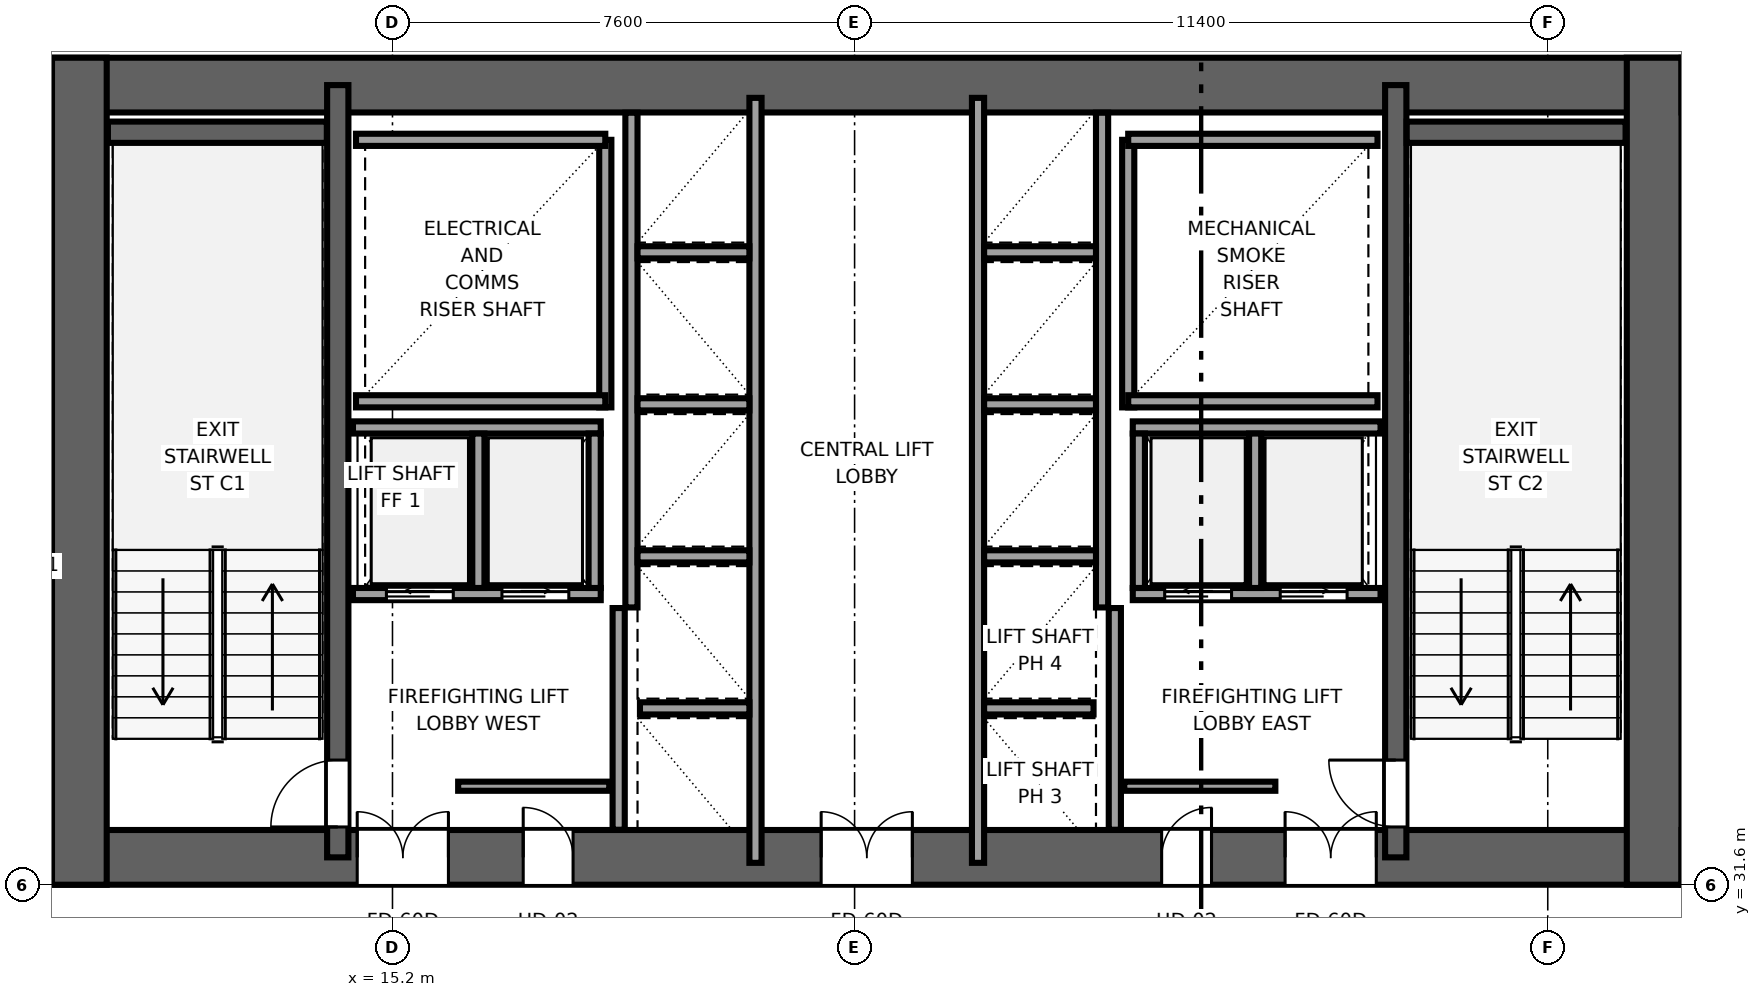
"""IFC4 building model, lengths in metres.
Left out: names, types, materials, properties, quantities, classifications, styles, units other than length and angle.
Written with IfcOpenShell. Run it as: python <this file> out.ifc"""

import sys

from ifc_helpers import new_model, si_unit, direction, frame, frame_2d, origin, place, context, subcontext, project, spatial, rectangle, extrude, source, transform, mapped, element, fill, save


model = new_model("IFC4")
c1 = context("Model", 3, precision=1e-05, world=origin(), true_north=direction((0.0, 1.0)))
c2 = subcontext(c1, "Body", "Model", "MODEL_VIEW")
j1 = project(units=[si_unit("LENGTHUNIT", "METRE"), si_unit("PLANEANGLEUNIT", "RADIAN")], contexts=[c1])
p1 = place(None, origin())
s1 = spatial("IfcSite", under=j1, at=p1, CompositionType="ELEMENT")
p2 = place(p1, origin())
s2 = spatial("IfcBuilding", under=s1, at=p2, CompositionType="ELEMENT")
p3 = place(p2, frame((0.0, 0.0, 92.35)))
s3 = spatial("IfcBuildingStorey", under=s2, at=p3, CompositionType="ELEMENT", Elevation=92.35)
p4 = place(p3, frame((9.6, 32.05, 0.0), z_axis=(0.0, 0.0, 1.0), x_axis=(1.0, 0.0, 0.0)))
e1 = element("IfcWall", 1, at=p4, inside=s3, PredefinedType="SHEAR", context=c2, shape_type="SweptSolid", body=[
    extrude(rectangle(XDim=26.8, YDim=0.9, at=frame_2d((13.4, 0.0))), origin(), (0.0, 0.0, 1.0), 3.55),
])
p5 = place(p4, frame((6.52, 0.0, 0.0), z_axis=(0.0, 0.0, 1.0), x_axis=(-1.0, 0.0, 0.0)))
e2 = element("IfcOpeningElement", 2, at=p5, cuts=e1, PredefinedType="OPENING", context=c2, shape_type="SweptSolid", body=[
    extrude(rectangle(XDim=1.5, YDim=2.04, at=frame_2d((0.75, 1.02))), frame((0.0, 0.46, 0.0), z_axis=(0.0, -1.0, 0.0), x_axis=(1.0, 0.0, 0.0)), (0.0, 0.0, 1.0), 0.92),
])
p6 = place(p4, frame((14.15, 0.0, 0.0), z_axis=(0.0, 0.0, 1.0), x_axis=(-1.0, 0.0, 0.0)))
e3 = element("IfcOpeningElement", 3, at=p6, cuts=e1, PredefinedType="OPENING", context=c2, shape_type="SweptSolid", body=[
    extrude(rectangle(XDim=1.5, YDim=2.04, at=frame_2d((0.75, 1.02))), frame((0.0, 0.46, 0.0), z_axis=(0.0, -1.0, 0.0), x_axis=(1.0, 0.0, 0.0)), (0.0, 0.0, 1.0), 0.92),
])
p7 = place(p4, frame((21.78, 0.0, 0.0), z_axis=(0.0, 0.0, 1.0), x_axis=(-1.0, 0.0, 0.0)))
e4 = element("IfcOpeningElement", 4, at=p7, cuts=e1, PredefinedType="OPENING", context=c2, shape_type="SweptSolid", body=[
    extrude(rectangle(XDim=1.5, YDim=2.04, at=frame_2d((0.75, 1.02))), frame((0.0, 0.46, 0.0), z_axis=(0.0, -1.0, 0.0), x_axis=(1.0, 0.0, 0.0)), (0.0, 0.0, 1.0), 0.92),
])
p8 = place(p4, frame((8.57, 0.0, 0.0), z_axis=(0.0, 0.0, 1.0), x_axis=(-1.0, 0.0, 0.0)))
e5 = element("IfcOpeningElement", 5, at=p8, cuts=e1, PredefinedType="OPENING", context=c2, shape_type="SweptSolid", body=[
    extrude(rectangle(XDim=0.82, YDim=2.01, at=frame_2d((0.41, 1.005))), frame((0.0, 0.46, 0.0), z_axis=(0.0, -1.0, 0.0), x_axis=(1.0, 0.0, 0.0)), (0.0, 0.0, 1.0), 0.92),
])
p9 = place(p4, frame((19.07, 0.0, 0.0), z_axis=(0.0, 0.0, 1.0), x_axis=(-1.0, 0.0, 0.0)))
e6 = element("IfcOpeningElement", 6, at=p9, cuts=e1, PredefinedType="OPENING", context=c2, shape_type="SweptSolid", body=[
    extrude(rectangle(XDim=0.82, YDim=2.01, at=frame_2d((0.41, 1.005))), frame((0.0, 0.46, 0.0), z_axis=(0.0, -1.0, 0.0), x_axis=(1.0, 0.0, 0.0)), (0.0, 0.0, 1.0), 0.92),
])
p10 = place(p3, frame((9.6, 44.75, 0.0), z_axis=(0.0, 0.0, 1.0), x_axis=(1.0, 0.0, 0.0)))
e7 = element("IfcWall", 7, at=p10, inside=s3, PredefinedType="SHEAR", context=c2, shape_type="SweptSolid", body=[
    extrude(rectangle(XDim=26.8, YDim=0.9, at=frame_2d((13.4, 0.0))), origin(), (0.0, 0.0, 1.0), 3.55),
])
for number, where, z_axis, x_axis in (
    (8, (10.05, 31.6, 0.0), (0.0, 0.0, 1.0), (0.0, 1.0, 0.0)),
    (9, (35.95, 31.6, 0.0), (0.0, 0.0, 1.0), (0.0, 1.0, 0.0)),
):
    element("IfcWall", number, at=place(p3, frame(where, z_axis=z_axis, x_axis=x_axis)), inside=s3, PredefinedType="SHEAR", context=c2, shape_type="SweptSolid", body=[
        extrude(rectangle(XDim=13.6, YDim=0.9, at=frame_2d((6.8, 0.0))), origin(), (0.0, 0.0, 1.0), 3.55),
    ])
p11 = place(p3, frame((14.3, 32.05, 0.0), z_axis=(0.0, 0.0, 1.0), x_axis=(0.0, 1.0, 0.0)))
e10 = element("IfcWall", 10, at=p11, inside=s3, PredefinedType="SHEAR", context=c2, shape_type="SweptSolid", body=[
    extrude(rectangle(XDim=12.7, YDim=0.35, at=frame_2d((6.35, 0.0))), origin(), (0.0, 0.0, 1.0), 3.55),
])
p12 = place(p11, frame((0.5, 0.0, 0.0)))
e11 = element("IfcOpeningElement", 11, at=p12, cuts=e10, PredefinedType="OPENING", context=c2, shape_type="SweptSolid", body=[
    extrude(rectangle(XDim=1.1, YDim=2.12, at=frame_2d((0.55, 1.06))), frame((0.0, 0.185, 0.0), z_axis=(0.0, -1.0, 0.0), x_axis=(1.0, 0.0, 0.0)), (0.0, 0.0, 1.0), 0.37),
])
p13 = place(p3, frame((31.7, 32.05, 0.0), z_axis=(0.0, 0.0, 1.0), x_axis=(0.0, 1.0, 0.0)))
e12 = element("IfcWall", 12, at=p13, inside=s3, PredefinedType="SHEAR", context=c2, shape_type="SweptSolid", body=[
    extrude(rectangle(XDim=12.7, YDim=0.35, at=frame_2d((6.35, 0.0))), origin(), (0.0, 0.0, 1.0), 3.55),
])
p14 = place(p13, frame((1.6, 0.0, 0.0), z_axis=(0.0, 0.0, 1.0), x_axis=(-1.0, 0.0, 0.0)))
e13 = element("IfcOpeningElement", 13, at=p14, cuts=e12, PredefinedType="OPENING", context=c2, shape_type="SweptSolid", body=[
    extrude(rectangle(XDim=1.1, YDim=2.12, at=frame_2d((0.55, 1.06))), frame((0.0, 0.185, 0.0), z_axis=(0.0, -1.0, 0.0), x_axis=(1.0, 0.0, 0.0)), (0.0, 0.0, 1.0), 0.37),
])
for number, where, z_axis, x_axis in (
    (14, (10.52, 43.975, 0.0), (0.0, 0.0, 1.0), (1.0, 0.0, 0.0)),
    (15, (31.88, 43.975, 0.0), (0.0, 0.0, 1.0), (1.0, 0.0, 0.0)),
):
    element("IfcWall", number, at=place(p3, frame(where, z_axis=z_axis, x_axis=x_axis)), inside=s3, PredefinedType="SHEAR", context=c2, shape_type="SweptSolid", body=[
        extrude(rectangle(XDim=3.6, YDim=0.35, at=frame_2d((1.8, 0.0))), origin(), (0.0, 0.0, 1.0), 3.55),
    ])
p15 = place(p3, frame((18.7, 39.45, 0.0), z_axis=(0.0, 0.0, 1.0), x_axis=(0.0, 1.0, 0.0)))
e16 = element("IfcWall", 16, at=p15, inside=s3, PredefinedType="SOLIDWALL", context=c2, shape_type="SweptSolid", body=[
    extrude(rectangle(XDim=4.4, YDim=0.2, at=frame_2d((2.2, 0.0))), origin(), (0.0, 0.0, 1.0), 3.25),
])
for number, where, z_axis, x_axis in (
    (17, (14.6, 39.55, 0.0), (0.0, 0.0, 1.0), (1.0, 0.0, 0.0)),
    (18, (14.6, 43.85, 0.0), (0.0, 0.0, 1.0), (1.0, 0.0, 0.0)),
):
    element("IfcWall", number, at=place(p3, frame(where, z_axis=z_axis, x_axis=x_axis)), inside=s3, PredefinedType="SOLIDWALL", context=c2, shape_type="SweptSolid", body=[
        extrude(rectangle(XDim=4.1, YDim=0.2, at=frame_2d((2.05, 0.0))), origin(), (0.0, 0.0, 1.0), 3.25),
    ])
p16 = place(p3, frame((27.3, 39.45, 0.0), z_axis=(0.0, 0.0, 1.0), x_axis=(0.0, 1.0, 0.0)))
e19 = element("IfcWall", 19, at=p16, inside=s3, PredefinedType="SOLIDWALL", context=c2, shape_type="SweptSolid", body=[
    extrude(rectangle(XDim=4.4, YDim=0.2, at=frame_2d((2.2, 0.0))), origin(), (0.0, 0.0, 1.0), 3.25),
])
for number, where, z_axis, x_axis in (
    (20, (27.3, 39.55, 0.0), (0.0, 0.0, 1.0), (1.0, 0.0, 0.0)),
    (21, (27.3, 43.85, 0.0), (0.0, 0.0, 1.0), (1.0, 0.0, 0.0)),
):
    element("IfcWall", number, at=place(p3, frame(where, z_axis=z_axis, x_axis=x_axis)), inside=s3, PredefinedType="SOLIDWALL", context=c2, shape_type="SweptSolid", body=[
        extrude(rectangle(XDim=4.1, YDim=0.2, at=frame_2d((2.05, 0.0))), origin(), (0.0, 0.0, 1.0), 3.25),
    ])
for number, where, z_axis, x_axis in (
    (22, (18.92, 32.504, 0.0), (0.0, 0.0, 1.0), (0.0, 1.0, 0.0)),
    (23, (27.08, 32.504, 0.0), (0.0, 0.0, 1.0), (0.0, 1.0, 0.0)),
):
    element("IfcWall", number, at=place(p3, frame(where, z_axis=z_axis, x_axis=x_axis)), inside=s3, PredefinedType="SOLIDWALL", context=c2, shape_type="SweptSolid", body=[
        extrude(rectangle(XDim=3.646, YDim=0.2, at=frame_2d((1.823, 0.0))), origin(), (0.0, 0.0, 1.0), 3.25),
    ])
p17 = place(p3, frame((21.17, 31.96, 0.0), z_axis=(0.0, 0.0, 1.0), x_axis=(0.0, 1.0, 0.0)))
e24 = element("IfcWall", 24, at=p17, inside=s3, PredefinedType="SOLIDWALL", context=c2, shape_type="SweptSolid", body=[
    extrude(rectangle(XDim=12.58, YDim=0.2, at=frame_2d((6.29, 0.0))), origin(), (0.0, 0.0, 1.0), 3.25),
])
p18 = place(p3, frame((19.13, 36.16, 0.0), z_axis=(0.0, 0.0, 1.0), x_axis=(0.0, 1.0, 0.0)))
e25 = element("IfcWall", 25, at=p18, inside=s3, PredefinedType="SOLIDWALL", context=c2, shape_type="SweptSolid", body=[
    extrude(rectangle(XDim=8.136, YDim=0.2, at=frame_2d((4.068, 0.0))), origin(), (0.0, 0.0, 1.0), 3.25),
])
p19 = place(p3, frame((19.27, 34.5, 0.0), z_axis=(0.0, 0.0, 1.0), x_axis=(1.0, 0.0, 0.0)))
e26 = element("IfcWall", 26, at=p19, inside=s3, PredefinedType="SOLIDWALL", context=c2, shape_type="SweptSolid", body=[
    extrude(rectangle(XDim=1.8, YDim=0.2, at=frame_2d((0.9, 0.0))), origin(), (0.0, 0.0, 1.0), 3.25),
])
for number, where, z_axis, x_axis in (
    (27, (19.23, 37.0, 0.0), (0.0, 0.0, 1.0), (1.0, 0.0, 0.0)),
    (28, (19.23, 39.5, 0.0), (0.0, 0.0, 1.0), (1.0, 0.0, 0.0)),
    (29, (19.23, 42.0, 0.0), (0.0, 0.0, 1.0), (1.0, 0.0, 0.0)),
):
    element("IfcWall", number, at=place(p3, frame(where, z_axis=z_axis, x_axis=x_axis)), inside=s3, PredefinedType="SOLIDWALL", context=c2, shape_type="SweptSolid", body=[
        extrude(rectangle(XDim=1.84, YDim=0.2, at=frame_2d((0.92, 0.0))), origin(), (0.0, 0.0, 1.0), 3.25),
    ])
p20 = place(p3, frame((27.375, 36.38, 0.0), z_axis=(0.0, 0.0, 1.0), x_axis=(1.0, 0.0, 0.0)))
e30 = element("IfcWall", 30, at=p20, inside=s3, PredefinedType="SOLIDWALL", context=c2, shape_type="SweptSolid", body=[
    extrude(rectangle(XDim=4.075, YDim=0.2, at=frame_2d((2.038, 0.0))), origin(), (0.0, 0.0, 1.0), 3.25),
])
p21 = place(p20, frame((0.525, 0.0, 0.0)))
e31 = element("IfcOpeningElement", 31, at=p21, cuts=e30, PredefinedType="OPENING", context=c2, shape_type="SweptSolid", body=[
    extrude(rectangle(XDim=1.1, YDim=2.12, at=frame_2d((0.55, 1.06))), frame((0.0, 0.11, 0.0), z_axis=(0.0, -1.0, 0.0), x_axis=(1.0, 0.0, 0.0)), (0.0, 0.0, 1.0), 0.22),
])
p22 = place(p20, frame((2.425, 0.0, 0.0)))
e32 = element("IfcOpeningElement", 32, at=p22, cuts=e30, PredefinedType="OPENING", context=c2, shape_type="SweptSolid", body=[
    extrude(rectangle(XDim=1.1, YDim=2.12, at=frame_2d((0.55, 1.06))), frame((0.0, 0.11, 0.0), z_axis=(0.0, -1.0, 0.0), x_axis=(1.0, 0.0, 0.0)), (0.0, 0.0, 1.0), 0.22),
])
p23 = place(p3, frame((27.375, 39.12, 0.0), z_axis=(0.0, 0.0, 1.0), x_axis=(1.0, 0.0, 0.0)))
e33 = element("IfcWall", 33, at=p23, inside=s3, PredefinedType="SOLIDWALL", context=c2, shape_type="SweptSolid", body=[
    extrude(rectangle(XDim=4.075, YDim=0.2, at=frame_2d((2.038, 0.0))), origin(), (0.0, 0.0, 1.0), 3.25),
])
for number, where, z_axis, x_axis in (
    (34, (27.475, 36.48, 0.0), (0.0, 0.0, 1.0), (0.0, 1.0, 0.0)),
    (35, (29.387, 36.48, 0.0), (0.0, 0.0, 1.0), (0.0, 1.0, 0.0)),
):
    element("IfcWall", number, at=place(p3, frame(where, z_axis=z_axis, x_axis=x_axis)), inside=s3, PredefinedType="SOLIDWALL", context=c2, shape_type="SweptSolid", body=[
        extrude(rectangle(XDim=2.54, YDim=0.2, at=frame_2d((1.27, 0.0))), origin(), (0.0, 0.0, 1.0), 3.25),
    ])
p24 = place(p3, frame((14.55, 36.38, 0.0), z_axis=(0.0, 0.0, 1.0), x_axis=(1.0, 0.0, 0.0)))
e36 = element("IfcWall", 36, at=p24, inside=s3, PredefinedType="SOLIDWALL", context=c2, shape_type="SweptSolid", body=[
    extrude(rectangle(XDim=4.075, YDim=0.2, at=frame_2d((2.038, 0.0))), origin(), (0.0, 0.0, 1.0), 3.25),
])
p25 = place(p24, frame((0.55, 0.0, 0.0)))
e37 = element("IfcOpeningElement", 37, at=p25, cuts=e36, PredefinedType="OPENING", context=c2, shape_type="SweptSolid", body=[
    extrude(rectangle(XDim=1.1, YDim=2.12, at=frame_2d((0.55, 1.06))), frame((0.0, 0.11, 0.0), z_axis=(0.0, -1.0, 0.0), x_axis=(1.0, 0.0, 0.0)), (0.0, 0.0, 1.0), 0.22),
])
p26 = place(p24, frame((2.45, 0.0, 0.0)))
e38 = element("IfcOpeningElement", 38, at=p26, cuts=e36, PredefinedType="OPENING", context=c2, shape_type="SweptSolid", body=[
    extrude(rectangle(XDim=1.1, YDim=2.12, at=frame_2d((0.55, 1.06))), frame((0.0, 0.11, 0.0), z_axis=(0.0, -1.0, 0.0), x_axis=(1.0, 0.0, 0.0)), (0.0, 0.0, 1.0), 0.22),
])
p27 = place(p3, frame((14.55, 39.12, 0.0), z_axis=(0.0, 0.0, 1.0), x_axis=(1.0, 0.0, 0.0)))
e39 = element("IfcWall", 39, at=p27, inside=s3, PredefinedType="SOLIDWALL", context=c2, shape_type="SweptSolid", body=[
    extrude(rectangle(XDim=4.075, YDim=0.2, at=frame_2d((2.038, 0.0))), origin(), (0.0, 0.0, 1.0), 3.25),
])
for number, where, z_axis, x_axis in (
    (40, (18.525, 36.48, 0.0), (0.0, 0.0, 1.0), (0.0, 1.0, 0.0)),
    (41, (16.613, 36.48, 0.0), (0.0, 0.0, 1.0), (0.0, 1.0, 0.0)),
):
    element("IfcWall", number, at=place(p3, frame(where, z_axis=z_axis, x_axis=x_axis)), inside=s3, PredefinedType="SOLIDWALL", context=c2, shape_type="SweptSolid", body=[
        extrude(rectangle(XDim=2.54, YDim=0.2, at=frame_2d((1.27, 0.0))), origin(), (0.0, 0.0, 1.0), 3.25),
    ])
p28 = place(p3, frame((24.83, 31.96, 0.0), z_axis=(0.0, 0.0, 1.0), x_axis=(0.0, 1.0, 0.0)))
e42 = element("IfcWall", 42, at=p28, inside=s3, PredefinedType="SOLIDWALL", context=c2, shape_type="SweptSolid", body=[
    extrude(rectangle(XDim=12.58, YDim=0.2, at=frame_2d((6.29, 0.0))), origin(), (0.0, 0.0, 1.0), 3.25),
])
p29 = place(p3, frame((26.87, 36.16, 0.0), z_axis=(0.0, 0.0, 1.0), x_axis=(0.0, 1.0, 0.0)))
e43 = element("IfcWall", 43, at=p29, inside=s3, PredefinedType="SOLIDWALL", context=c2, shape_type="SweptSolid", body=[
    extrude(rectangle(XDim=8.136, YDim=0.2, at=frame_2d((4.068, 0.0))), origin(), (0.0, 0.0, 1.0), 3.25),
])
p30 = place(p3, frame((24.93, 34.5, 0.0), z_axis=(0.0, 0.0, 1.0), x_axis=(1.0, 0.0, 0.0)))
e44 = element("IfcWall", 44, at=p30, inside=s3, PredefinedType="SOLIDWALL", context=c2, shape_type="SweptSolid", body=[
    extrude(rectangle(XDim=1.8, YDim=0.2, at=frame_2d((0.9, 0.0))), origin(), (0.0, 0.0, 1.0), 3.25),
])
for number, where, z_axis, x_axis in (
    (45, (24.93, 37.0, 0.0), (0.0, 0.0, 1.0), (1.0, 0.0, 0.0)),
    (46, (24.93, 39.5, 0.0), (0.0, 0.0, 1.0), (1.0, 0.0, 0.0)),
    (47, (24.93, 42.0, 0.0), (0.0, 0.0, 1.0), (1.0, 0.0, 0.0)),
):
    element("IfcWall", number, at=place(p3, frame(where, z_axis=z_axis, x_axis=x_axis)), inside=s3, PredefinedType="SOLIDWALL", context=c2, shape_type="SweptSolid", body=[
        extrude(rectangle(XDim=1.84, YDim=0.2, at=frame_2d((0.92, 0.0))), origin(), (0.0, 0.0, 1.0), 3.25),
    ])
for number, where, z_axis, x_axis in (
    (48, (16.28, 33.22, 0.0), (0.0, 0.0, 1.0), (1.0, 0.0, 0.0)),
    (49, (27.235, 33.22, 0.0), (0.0, 0.0, 1.0), (1.0, 0.0, 0.0)),
):
    element("IfcWall", number, at=place(p3, frame(where, z_axis=z_axis, x_axis=x_axis)), inside=s3, PredefinedType="PARTITIONING", context=c2, shape_type="SweptSolid", body=[
        extrude(rectangle(XDim=2.485, YDim=0.15, at=frame_2d((1.242, 0.0))), origin(), (0.0, 0.0, 1.0), 3.25),
    ])
m1 = source(origin(), c2, "Body", "SweptSolid", [
    extrude(rectangle(XDim=1.1, YDim=2.12, at=frame_2d((0.55, 1.06))), frame((0.0, 0.025, 0.0), z_axis=(0.0, -1.0, 0.0), x_axis=(1.0, 0.0, 0.0)), (0.0, 0.0, 1.0), 0.05),
])
p31 = place(p12, origin())
e50 = element("IfcDoor", 50, at=p31, inside=s3, OperationType="SINGLE_SWING_LEFT", PredefinedType="DOOR", context=c2, shape_type="MappedRepresentation", body=[
    mapped(m1, transform((0.0, 0.0, 0.0), x_axis=(1.0, 0.0, 0.0), y_axis=(0.0, 1.0, 0.0), z_axis=(0.0, 0.0, 1.0), scale=1.0)),
])
fill(e11, e50)
p32 = place(p14, origin())
e51 = element("IfcDoor", 51, at=p32, inside=s3, OperationType="SINGLE_SWING_RIGHT", PredefinedType="DOOR", context=c2, shape_type="MappedRepresentation", body=[
    mapped(m1, transform((0.0, 0.0, 0.0), x_axis=(1.0, 0.0, 0.0), y_axis=(0.0, 1.0, 0.0), z_axis=(0.0, 0.0, 1.0), scale=1.0)),
])
fill(e13, e51)
m2 = source(origin(), c2, "Body", "SweptSolid", [
    extrude(rectangle(XDim=1.5, YDim=2.04, at=frame_2d((0.75, 1.02))), frame((0.0, 0.025, 0.0), z_axis=(0.0, -1.0, 0.0), x_axis=(1.0, 0.0, 0.0)), (0.0, 0.0, 1.0), 0.05),
])
p33 = place(p5, origin())
e52 = element("IfcDoor", 52, at=p33, inside=s3, OperationType="DOUBLE_DOOR_SINGLE_SWING", PredefinedType="DOOR", context=c2, shape_type="MappedRepresentation", body=[
    mapped(m2, transform((0.0, 0.0, 0.0), x_axis=(1.0, 0.0, 0.0), y_axis=(0.0, 1.0, 0.0), z_axis=(0.0, 0.0, 1.0), scale=1.0)),
])
fill(e2, e52)
p34 = place(p6, origin())
e53 = element("IfcDoor", 53, at=p34, inside=s3, OperationType="DOUBLE_DOOR_SINGLE_SWING", PredefinedType="DOOR", context=c2, shape_type="MappedRepresentation", body=[
    mapped(m2, transform((0.0, 0.0, 0.0), x_axis=(1.0, 0.0, 0.0), y_axis=(0.0, 1.0, 0.0), z_axis=(0.0, 0.0, 1.0), scale=1.0)),
])
fill(e3, e53)
p35 = place(p7, origin())
e54 = element("IfcDoor", 54, at=p35, inside=s3, OperationType="DOUBLE_DOOR_SINGLE_SWING", PredefinedType="DOOR", context=c2, shape_type="MappedRepresentation", body=[
    mapped(m2, transform((0.0, 0.0, 0.0), x_axis=(1.0, 0.0, 0.0), y_axis=(0.0, 1.0, 0.0), z_axis=(0.0, 0.0, 1.0), scale=1.0)),
])
fill(e4, e54)
m3 = source(origin(), c2, "Body", "SweptSolid", [
    extrude(rectangle(XDim=0.82, YDim=2.01, at=frame_2d((0.41, 1.005))), frame((0.0, 0.025, 0.0), z_axis=(0.0, -1.0, 0.0), x_axis=(1.0, 0.0, 0.0)), (0.0, 0.0, 1.0), 0.05),
])
p36 = place(p8, origin())
e55 = element("IfcDoor", 55, at=p36, inside=s3, OperationType="SINGLE_SWING_LEFT", PredefinedType="DOOR", context=c2, shape_type="MappedRepresentation", body=[
    mapped(m3, transform((0.0, 0.0, 0.0), x_axis=(1.0, 0.0, 0.0), y_axis=(0.0, 1.0, 0.0), z_axis=(0.0, 0.0, 1.0), scale=1.0)),
])
fill(e5, e55)
p37 = place(p9, origin())
e56 = element("IfcDoor", 56, at=p37, inside=s3, OperationType="SINGLE_SWING_RIGHT", PredefinedType="DOOR", context=c2, shape_type="MappedRepresentation", body=[
    mapped(m3, transform((0.0, 0.0, 0.0), x_axis=(1.0, 0.0, 0.0), y_axis=(0.0, 1.0, 0.0), z_axis=(0.0, 0.0, 1.0), scale=1.0)),
])
fill(e6, e56)
m4 = source(origin(), c2, "Body", "SweptSolid", [
    extrude(rectangle(XDim=1.1, YDim=2.12, at=frame_2d((0.55, 1.06))), frame((0.0, 0.025, 0.0), z_axis=(0.0, -1.0, 0.0), x_axis=(1.0, 0.0, 0.0)), (0.0, 0.0, 1.0), 0.05),
])
p38 = place(p21, origin())
e57 = element("IfcDoor", 57, at=p38, inside=s3, OperationType="SLIDING_TO_LEFT", PredefinedType="DOOR", context=c2, shape_type="MappedRepresentation", body=[
    mapped(m4, transform((0.0, 0.0, 0.0), x_axis=(1.0, 0.0, 0.0), y_axis=(0.0, 1.0, 0.0), z_axis=(0.0, 0.0, 1.0), scale=1.0)),
])
fill(e31, e57)
p39 = place(p22, origin())
e58 = element("IfcDoor", 58, at=p39, inside=s3, OperationType="SLIDING_TO_RIGHT", PredefinedType="DOOR", context=c2, shape_type="MappedRepresentation", body=[
    mapped(m4, transform((0.0, 0.0, 0.0), x_axis=(1.0, 0.0, 0.0), y_axis=(0.0, 1.0, 0.0), z_axis=(0.0, 0.0, 1.0), scale=1.0)),
])
fill(e32, e58)
p40 = place(p25, origin())
e59 = element("IfcDoor", 59, at=p40, inside=s3, OperationType="SLIDING_TO_LEFT", PredefinedType="DOOR", context=c2, shape_type="MappedRepresentation", body=[
    mapped(m4, transform((0.0, 0.0, 0.0), x_axis=(1.0, 0.0, 0.0), y_axis=(0.0, 1.0, 0.0), z_axis=(0.0, 0.0, 1.0), scale=1.0)),
])
fill(e37, e59)
p41 = place(p26, origin())
e60 = element("IfcDoor", 60, at=p41, inside=s3, OperationType="SLIDING_TO_RIGHT", PredefinedType="DOOR", context=c2, shape_type="MappedRepresentation", body=[
    mapped(m4, transform((0.0, 0.0, 0.0), x_axis=(1.0, 0.0, 0.0), y_axis=(0.0, 1.0, 0.0), z_axis=(0.0, 0.0, 1.0), scale=1.0)),
])
fill(e38, e60)
save(model, sys.argv[1])
